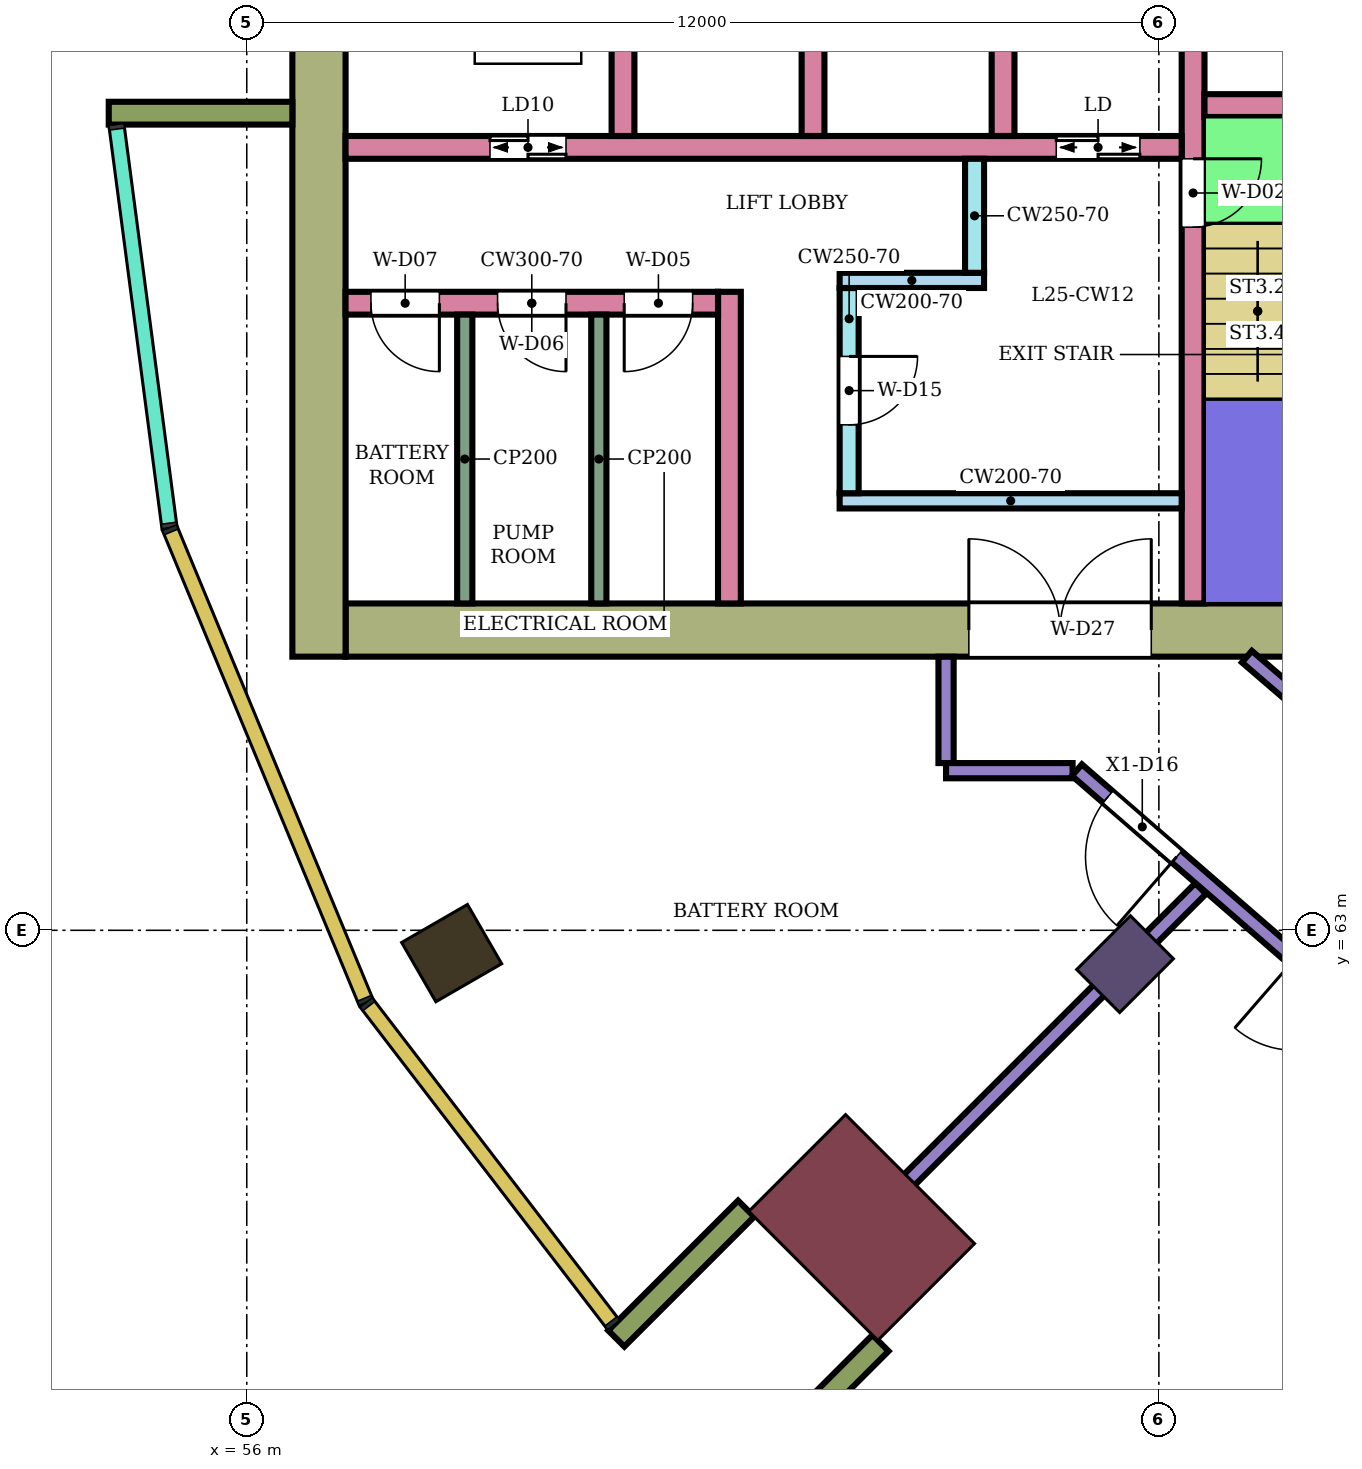
"""IFC4 building model, lengths in metres.
Left out: names, types, materials, properties, quantities, classifications, styles, units other than length and angle.
Written with IfcOpenShell. Run it as: python <this file> out.ifc"""

import sys

from ifc_helpers import new_model, si_unit, direction, frame, frame_2d, origin, origin_2d, place, context, subcontext, project, spatial, rectangle, extrude, element, fill, save


model = new_model("IFC4")
c1 = context("Model", 3, precision=1e-05, world=origin(), true_north=direction((0.0, 1.0)))
c2 = subcontext(c1, "Body", "Model", "MODEL_VIEW")
j1 = project(units=[si_unit("LENGTHUNIT", "METRE"), si_unit("PLANEANGLEUNIT", "RADIAN")], contexts=[c1])
p1 = place(None, origin())
s1 = spatial("IfcSite", under=j1, at=p1, CompositionType="ELEMENT")
p2 = place(p1, origin())
s2 = spatial("IfcBuilding", under=s1, at=p2, CompositionType="ELEMENT")
p3 = place(p2, frame((0.0, 0.0, 109.0)))
s3 = spatial("IfcBuildingStorey", under=s2, at=p3, CompositionType="ELEMENT", Elevation=109.0)
p4 = place(p3, frame((58.696, 62.7, 0.0), z_axis=(0.0, 0.0, 1.0), x_axis=(-0.866025403784, -0.5, 0.0)))
e1 = element("IfcColumn", 1, at=p4, inside=s3, PredefinedType="COLUMN", context=c2, shape_type="SweptSolid", body=[
    extrude(rectangle(XDim=1.0, YDim=0.9, at=origin_2d()), origin(), (0.0, 0.0, 1.0), 5.6),
])
p5 = place(p3, frame((67.555, 62.555, 0.0), z_axis=(0.0, 0.0, 1.0), x_axis=(-0.707106781187, -0.707106781187, 0.0)))
e2 = element("IfcColumn", 2, at=p5, inside=s3, PredefinedType="COLUMN", context=c2, shape_type="SweptSolid", body=[
    extrude(rectangle(XDim=1.0, YDim=0.8, at=origin_2d()), origin(), (0.0, 0.0, 1.0), 5.6),
])
p6 = place(p3, frame((64.09, 59.09, 0.0), z_axis=(0.0, 0.0, 1.0), x_axis=(-0.707106781187, -0.707106781187, 0.0)))
e3 = element("IfcColumn", 3, at=p6, inside=s3, PredefinedType="COLUMN", context=c2, shape_type="SweptSolid", body=[
    extrude(rectangle(XDim=1.8, YDim=2.4, at=origin_2d()), origin(), (0.0, 0.0, 1.0), 5.6),
])
p7 = place(p3, frame((72.1, 66.95, 0.0), z_axis=(0.0, 0.0, 1.0), x_axis=(-1.0, 0.0, 0.0)))
e4 = element("IfcWall", 4, at=p7, inside=s3, PredefinedType="SHEAR", context=c2, shape_type="SweptSolid", body=[
    extrude(rectangle(XDim=14.8, YDim=0.7, at=frame_2d((7.4, 0.0))), origin(), (0.0, 0.0, 1.0), 5.28),
])
p8 = place(p7, frame((4.2, 0.0, 0.0)))
e5 = element("IfcOpeningElement", 5, at=p8, cuts=e4, PredefinedType="OPENING", context=c2, shape_type="SweptSolid", body=[
    extrude(rectangle(XDim=2.4, YDim=2.4, at=frame_2d((1.2, 1.2))), frame((0.0, 0.36, 0.0), z_axis=(0.0, -1.0, 0.0), x_axis=(1.0, 0.0, 0.0)), (0.0, 0.0, 1.0), 0.72),
])
p9 = place(p3, frame((56.95, 83.4, 0.0), z_axis=(0.0, 0.0, 1.0), x_axis=(0.0, -1.0, 0.0)))
e6 = element("IfcWall", 6, at=p9, inside=s3, PredefinedType="SHEAR", context=c2, shape_type="SweptSolid", body=[
    extrude(rectangle(XDim=16.8, YDim=0.7, at=frame_2d((8.4, 0.0))), origin(), (0.0, 0.0, 1.0), 5.28),
])
p10 = place(p3, frame((68.45, 75.0, 0.0), z_axis=(0.0, 0.0, 1.0), x_axis=(0.0, -1.0, 0.0)))
e7 = element("IfcWall", 7, at=p10, inside=s3, PredefinedType="SHEAR", context=c2, shape_type="SweptSolid", body=[
    extrude(rectangle(XDim=7.7, YDim=0.3, at=frame_2d((3.85, 0.0))), origin(), (0.0, 0.0, 1.0), 5.28),
])
p11 = place(p10, frame((1.85, 0.0, 0.0)))
e8 = element("IfcOpeningElement", 8, at=p11, cuts=e7, PredefinedType="OPENING", context=c2, shape_type="SweptSolid", body=[
    extrude(rectangle(XDim=0.9, YDim=2.1, at=frame_2d((0.45, 1.05))), frame((0.0, 0.16, 0.0), z_axis=(0.0, -1.0, 0.0), x_axis=(1.0, 0.0, 0.0)), (0.0, 0.0, 1.0), 0.32),
])
p12 = place(p3, frame((71.65, 73.85, 0.0), z_axis=(0.0, 0.0, 1.0), x_axis=(-1.0, 0.0, 0.0)))
e9 = element("IfcWall", 9, at=p12, inside=s3, PredefinedType="SHEAR", context=c2, shape_type="SweptSolid", body=[
    extrude(rectangle(XDim=3.05, YDim=0.3, at=frame_2d((1.525, 0.0))), origin(), (0.0, 0.0, 1.0), 5.28),
])
p13 = place(p12, frame((1.1, 0.0, 0.0)))
e10 = element("IfcOpeningElement", 10, at=p13, cuts=e9, PredefinedType="OPENING", context=c2, shape_type="SweptSolid", body=[
    extrude(rectangle(XDim=0.7, YDim=2.0, at=frame_2d((0.35, 1.0))), frame((0.0, 0.16, 0.0), z_axis=(0.0, -1.0, 0.0), x_axis=(1.0, 0.0, 0.0)), (0.0, 0.0, 1.0), 0.32),
])
p14 = place(p3, frame((68.3, 73.3, 0.0), z_axis=(0.0, 0.0, 1.0), x_axis=(-1.0, 0.0, 0.0)))
e11 = element("IfcWall", 11, at=p14, inside=s3, PredefinedType="SHEAR", context=c2, shape_type="SweptSolid", body=[
    extrude(rectangle(XDim=11.0, YDim=0.3, at=frame_2d((5.5, 0.0))), origin(), (0.0, 0.0, 1.0), 5.28),
])
p15 = place(p14, frame((0.55, 0.0, 0.0)))
e12 = element("IfcOpeningElement", 12, at=p15, cuts=e11, PredefinedType="OPENING", context=c2, shape_type="SweptSolid", body=[
    extrude(rectangle(XDim=1.1, YDim=2.1, at=frame_2d((0.55, 1.05))), frame((0.0, 0.16, 0.0), z_axis=(0.0, -1.0, 0.0), x_axis=(1.0, 0.0, 0.0)), (0.0, 0.0, 1.0), 0.32),
])
p16 = place(p14, frame((8.1, 0.0, 0.0)))
e13 = element("IfcOpeningElement", 13, at=p16, cuts=e11, PredefinedType="OPENING", context=c2, shape_type="SweptSolid", body=[
    extrude(rectangle(XDim=1.0, YDim=2.1, at=frame_2d((0.5, 1.05))), frame((0.0, 0.16, 0.0), z_axis=(0.0, -1.0, 0.0), x_axis=(1.0, 0.0, 0.0)), (0.0, 0.0, 1.0), 0.32),
])
for number, where, z_axis, x_axis in (
    (14, (65.95, 76.0, 0.0), (0.0, 0.0, 1.0), (0.0, -1.0, 0.0)),
    (15, (63.45, 76.0, 0.0), (0.0, 0.0, 1.0), (0.0, -1.0, 0.0)),
    (16, (60.95, 76.0, 0.0), (0.0, 0.0, 1.0), (0.0, -1.0, 0.0)),
):
    element("IfcWall", number, at=place(p3, frame(where, z_axis=z_axis, x_axis=x_axis)), inside=s3, PredefinedType="SHEAR", context=c2, shape_type="SweptSolid", body=[
        extrude(rectangle(XDim=2.55, YDim=0.3, at=frame_2d((1.275, 0.0))), origin(), (0.0, 0.0, 1.0), 5.28),
    ])
p17 = place(p3, frame((68.3, 68.65, 0.0), z_axis=(0.0, 0.0, 1.0), x_axis=(-1.0, 0.0, 0.0)))
e17 = element("IfcWall", 17, at=p17, inside=s3, PredefinedType="SHEAR", context=c2, shape_type="SweptSolid", body=[
    extrude(rectangle(XDim=4.5, YDim=0.2, at=frame_2d((2.25, 0.0))), origin(), (0.0, 0.0, 1.0), 5.28),
])
p18 = place(p3, frame((63.925, 71.45, 0.0), z_axis=(0.0, 0.0, 1.0), x_axis=(0.0, -1.0, 0.0)))
e18 = element("IfcWall", 18, at=p18, inside=s3, PredefinedType="SHEAR", context=c2, shape_type="SweptSolid", body=[
    extrude(rectangle(XDim=2.7, YDim=0.25, at=frame_2d((1.35, 0.0))), origin(), (0.0, 0.0, 1.0), 5.28),
])
p19 = place(p18, frame((0.9, 0.0, 0.0)))
e19 = element("IfcOpeningElement", 19, at=p19, cuts=e18, PredefinedType="OPENING", context=c2, shape_type="SweptSolid", body=[
    extrude(rectangle(XDim=0.9, YDim=2.1, at=frame_2d((0.45, 1.05))), frame((0.0, 0.135, 0.0), z_axis=(0.0, -1.0, 0.0), x_axis=(1.0, 0.0, 0.0)), (0.0, 0.0, 1.0), 0.27),
])
p20 = place(p3, frame((65.7, 71.55, 0.0), z_axis=(0.0, 0.0, 1.0), x_axis=(-1.0, 0.0, 0.0)))
e20 = element("IfcWall", 20, at=p20, inside=s3, PredefinedType="SHEAR", context=c2, shape_type="SweptSolid", body=[
    extrude(rectangle(XDim=1.9, YDim=0.2, at=frame_2d((0.95, 0.0))), origin(), (0.0, 0.0, 1.0), 5.28),
])
p21 = place(p3, frame((65.575, 73.15, 0.0), z_axis=(0.0, 0.0, 1.0), x_axis=(0.0, -1.0, 0.0)))
e21 = element("IfcWall", 21, at=p21, inside=s3, PredefinedType="SHEAR", context=c2, shape_type="SweptSolid", body=[
    extrude(rectangle(XDim=1.5, YDim=0.25, at=frame_2d((0.75, 0.0))), origin(), (0.0, 0.0, 1.0), 5.28),
])
p22 = place(p3, frame((62.35, 71.4, 0.0), z_axis=(0.0, 0.0, 1.0), x_axis=(0.0, -1.0, 0.0)))
e22 = element("IfcWall", 22, at=p22, inside=s3, PredefinedType="SHEAR", context=c2, shape_type="SweptSolid", body=[
    extrude(rectangle(XDim=4.1, YDim=0.3, at=frame_2d((2.05, 0.0))), origin(), (0.0, 0.0, 1.0), 5.28),
])
p23 = place(p3, frame((62.2, 71.25, 0.0), z_axis=(0.0, 0.0, 1.0), x_axis=(-1.0, 0.0, 0.0)))
e23 = element("IfcWall", 23, at=p23, inside=s3, PredefinedType="SHEAR", context=c2, shape_type="SweptSolid", body=[
    extrude(rectangle(XDim=4.9, YDim=0.3, at=frame_2d((2.45, 0.0))), origin(), (0.0, 0.0, 1.0), 5.28),
])
p24 = place(p23, frame((0.334, 0.0, 0.0)))
e24 = element("IfcOpeningElement", 24, at=p24, cuts=e23, PredefinedType="OPENING", context=c2, shape_type="SweptSolid", body=[
    extrude(rectangle(XDim=0.9, YDim=2.1, at=frame_2d((0.45, 1.05))), frame((0.0, 0.16, 0.0), z_axis=(0.0, -1.0, 0.0), x_axis=(1.0, 0.0, 0.0)), (0.0, 0.0, 1.0), 0.32),
])
p25 = place(p23, frame((2.0, 0.0, 0.0)))
e25 = element("IfcOpeningElement", 25, at=p25, cuts=e23, PredefinedType="OPENING", context=c2, shape_type="SweptSolid", body=[
    extrude(rectangle(XDim=0.9, YDim=2.1, at=frame_2d((0.45, 1.05))), frame((0.0, 0.16, 0.0), z_axis=(0.0, -1.0, 0.0), x_axis=(1.0, 0.0, 0.0)), (0.0, 0.0, 1.0), 0.32),
])
p26 = place(p23, frame((3.666, 0.0, 0.0)))
e26 = element("IfcOpeningElement", 26, at=p26, cuts=e23, PredefinedType="OPENING", context=c2, shape_type="SweptSolid", body=[
    extrude(rectangle(XDim=0.9, YDim=2.1, at=frame_2d((0.45, 1.05))), frame((0.0, 0.16, 0.0), z_axis=(0.0, -1.0, 0.0), x_axis=(1.0, 0.0, 0.0)), (0.0, 0.0, 1.0), 0.32),
])
for number, where, z_axis, x_axis in (
    (27, (56.6, 73.75, 0.0), (0.0, 0.0, 1.0), (-1.0, 0.0, 0.0)),
    (28, (62.57, 59.338, 0.0), (0.0, 0.0, 1.0), (-0.707, -0.707, 0.0)),
    (29, (64.338, 57.57, 0.0), (0.0, 0.0, 1.0), (-0.707, -0.707, 0.0)),
):
    element("IfcWall", number, at=place(p3, frame(where, z_axis=z_axis, x_axis=x_axis)), inside=s3, PredefinedType="NOTDEFINED", context=c2, shape_type="SweptSolid", body=[
        extrude(rectangle(XDim=2.416, YDim=0.3, at=frame_2d((1.208, 0.0))), origin(), (0.0, 0.0, 1.0), 5.6),
    ])
p27 = place(p3, frame((63.596, 58.596, 0.0), z_axis=(0.0, 0.0, 1.0), x_axis=(0.707106781187, 0.707106781187, 0.0)))
e30 = element("IfcWall", 30, at=p27, inside=s3, PredefinedType="PARTITIONING", context=c2, shape_type="SweptSolid", body=[
    extrude(rectangle(XDim=7.005, YDim=0.2, at=frame_2d((3.502, 0.0))), origin(), (0.0, 0.0, 1.0), 5.15),
])
p28 = place(p3, frame((65.2, 65.2, 0.0), z_axis=(0.0, 0.0, 1.0), x_axis=(0.0, 1.0, 0.0)))
e31 = element("IfcWall", 31, at=p28, inside=s3, PredefinedType="PARTITIONING", context=c2, shape_type="SweptSolid", body=[
    extrude(rectangle(XDim=1.399, YDim=0.2, at=frame_2d((0.7, 0.0))), origin(), (0.0, 0.0, 1.0), 5.15),
])
p29 = place(p3, frame((65.2, 65.1, 0.0), z_axis=(0.0, 0.0, 1.0), x_axis=(1.0, 0.0, 0.0)))
e32 = element("IfcWall", 32, at=p29, inside=s3, PredefinedType="PARTITIONING", context=c2, shape_type="SweptSolid", body=[
    extrude(rectangle(XDim=1.665, YDim=0.2, at=frame_2d((0.833, 0.0))), origin(), (0.0, 0.0, 1.0), 5.15),
])
p30 = place(p3, frame((66.922, 65.108, 0.0), z_axis=(0.0, 0.0, 1.0), x_axis=(0.755027260387, -0.655693400968, 0.0)))
e33 = element("IfcWall", 33, at=p30, inside=s3, PredefinedType="PARTITIONING", context=c2, shape_type="SweptSolid", body=[
    extrude(rectangle(XDim=6.516, YDim=0.2, at=frame_2d((3.258, 0.0))), origin(), (0.0, 0.0, 1.0), 5.15),
])
p31 = place(p30, frame((3.792, 0.0, 0.0)))
e34 = element("IfcOpeningElement", 34, at=p31, cuts=e33, PredefinedType="OPENING", context=c2, shape_type="SweptSolid", body=[
    extrude(rectangle(XDim=1.2, YDim=2.4, at=frame_2d((0.6, 1.2))), frame((0.0, 0.11, 0.0), z_axis=(0.0, -1.0, 0.0), x_axis=(1.0, 0.0, 0.0)), (0.0, 0.0, 1.0), 0.22),
])
p32 = place(p30, frame((0.539, 0.0, 0.0)))
e35 = element("IfcOpeningElement", 35, at=p32, cuts=e33, PredefinedType="OPENING", context=c2, shape_type="SweptSolid", body=[
    extrude(rectangle(XDim=1.2, YDim=2.4, at=frame_2d((0.6, 1.2))), frame((0.0, 0.11, 0.0), z_axis=(0.0, -1.0, 0.0), x_axis=(1.0, 0.0, 0.0)), (0.0, 0.0, 1.0), 0.22),
])
p33 = place(p3, frame((69.158, 66.6, 0.0), z_axis=(0.0, 0.0, 1.0), x_axis=(0.758063092745, -0.652181222835, 0.0)))
e36 = element("IfcWall", 36, at=p33, inside=s3, PredefinedType="PARTITIONING", context=c2, shape_type="SweptSolid", body=[
    extrude(rectangle(XDim=5.16, YDim=0.2, at=frame_2d((2.58, 0.0))), origin(), (0.0, 0.0, 1.0), 5.15),
])
p34 = place(p33, frame((2.015, 0.0, 0.0)))
e37 = element("IfcOpeningElement", 37, at=p34, cuts=e36, PredefinedType="OPENING", context=c2, shape_type="SweptSolid", body=[
    extrude(rectangle(XDim=1.2, YDim=2.4, at=frame_2d((0.6, 1.2))), frame((0.0, 0.11, 0.0), z_axis=(0.0, -1.0, 0.0), x_axis=(1.0, 0.0, 0.0)), (0.0, 0.0, 1.0), 0.22),
])
for number, where, z_axis, x_axis in (
    (38, (60.632, 71.1, 0.0), (0.0, 0.0, 1.0), (0.0, -1.0, 0.0)),
    (39, (58.868, 71.1, 0.0), (0.0, 0.0, 1.0), (0.0, -1.0, 0.0)),
):
    element("IfcWall", number, at=place(p3, frame(where, z_axis=z_axis, x_axis=x_axis)), inside=s3, PredefinedType="PARTITIONING", context=c2, shape_type="SweptSolid", body=[
        extrude(rectangle(XDim=3.8, YDim=0.2, at=frame_2d((1.9, 0.0))), origin(), (0.0, 0.0, 1.0), 5.28),
    ])
p35 = place(p32, frame((1.2, 0.0, 0.0), z_axis=(0.0, 0.0, 1.0), x_axis=(-1.0, 0.0, 0.0)))
e40 = element("IfcDoor", 40, at=p35, inside=s3, OperationType="SINGLE_SWING_LEFT", PredefinedType="DOOR", context=c2, shape_type="SweptSolid", body=[
    extrude(rectangle(XDim=1.2, YDim=2.4, at=frame_2d((0.6, 1.2))), frame((0.0, 0.025, 0.0), z_axis=(0.0, -1.0, 0.0), x_axis=(1.0, 0.0, 0.0)), (0.0, 0.0, 1.0), 0.05),
])
fill(e35, e40)
p36 = place(p11, origin())
e41 = element("IfcDoor", 41, at=p36, inside=s3, OperationType="SINGLE_SWING_LEFT", PredefinedType="DOOR", context=c2, shape_type="SweptSolid", body=[
    extrude(rectangle(XDim=0.9, YDim=2.1, at=frame_2d((0.45, 1.05))), frame((0.0, 0.025, 0.0), z_axis=(0.0, -1.0, 0.0), x_axis=(1.0, 0.0, 0.0)), (0.0, 0.0, 1.0), 0.05),
])
fill(e8, e41)
p37 = place(p15, origin())
e42 = element("IfcDoor", 42, at=p37, inside=s3, OperationType="DOUBLE_DOOR_SLIDING", PredefinedType="DOOR", context=c2, shape_type="SweptSolid", body=[
    extrude(rectangle(XDim=1.1, YDim=2.1, at=frame_2d((0.55, 1.05))), frame((0.0, 0.025, 0.0), z_axis=(0.0, -1.0, 0.0), x_axis=(1.0, 0.0, 0.0)), (0.0, 0.0, 1.0), 0.05),
])
fill(e12, e42)
p38 = place(p16, origin())
e43 = element("IfcDoor", 43, at=p38, inside=s3, OperationType="DOUBLE_DOOR_SLIDING", PredefinedType="DOOR", context=c2, shape_type="SweptSolid", body=[
    extrude(rectangle(XDim=1.0, YDim=2.1, at=frame_2d((0.5, 1.05))), frame((0.0, 0.025, 0.0), z_axis=(0.0, -1.0, 0.0), x_axis=(1.0, 0.0, 0.0)), (0.0, 0.0, 1.0), 0.05),
])
fill(e13, e43)
p39 = place(p19, origin())
e44 = element("IfcDoor", 44, at=p39, inside=s3, OperationType="SINGLE_SWING_LEFT", PredefinedType="DOOR", context=c2, shape_type="SweptSolid", body=[
    extrude(rectangle(XDim=0.9, YDim=2.1, at=frame_2d((0.45, 1.05))), frame((0.0, 0.025, 0.0), z_axis=(0.0, -1.0, 0.0), x_axis=(1.0, 0.0, 0.0)), (0.0, 0.0, 1.0), 0.05),
])
fill(e19, e44)
p40 = place(p24, origin())
e45 = element("IfcDoor", 45, at=p40, inside=s3, OperationType="SINGLE_SWING_RIGHT", PredefinedType="DOOR", context=c2, shape_type="SweptSolid", body=[
    extrude(rectangle(XDim=0.9, YDim=2.1, at=frame_2d((0.45, 1.05))), frame((0.0, 0.025, 0.0), z_axis=(0.0, -1.0, 0.0), x_axis=(1.0, 0.0, 0.0)), (0.0, 0.0, 1.0), 0.05),
])
fill(e24, e45)
p41 = place(p25, origin())
e46 = element("IfcDoor", 46, at=p41, inside=s3, OperationType="SINGLE_SWING_LEFT", PredefinedType="DOOR", context=c2, shape_type="SweptSolid", body=[
    extrude(rectangle(XDim=0.9, YDim=2.1, at=frame_2d((0.45, 1.05))), frame((0.0, 0.025, 0.0), z_axis=(0.0, -1.0, 0.0), x_axis=(1.0, 0.0, 0.0)), (0.0, 0.0, 1.0), 0.05),
])
fill(e25, e46)
p42 = place(p26, origin())
e47 = element("IfcDoor", 47, at=p42, inside=s3, OperationType="SINGLE_SWING_LEFT", PredefinedType="DOOR", context=c2, shape_type="SweptSolid", body=[
    extrude(rectangle(XDim=0.9, YDim=2.1, at=frame_2d((0.45, 1.05))), frame((0.0, 0.025, 0.0), z_axis=(0.0, -1.0, 0.0), x_axis=(1.0, 0.0, 0.0)), (0.0, 0.0, 1.0), 0.05),
])
fill(e26, e47)
p43 = place(p8, frame((2.4, 0.0, 0.0), z_axis=(0.0, 0.0, 1.0), x_axis=(-1.0, 0.0, 0.0)))
e48 = element("IfcDoor", 48, at=p43, inside=s3, OperationType="DOUBLE_DOOR_SINGLE_SWING", PredefinedType="DOOR", context=c2, shape_type="SweptSolid", body=[
    extrude(rectangle(XDim=2.4, YDim=2.4, at=frame_2d((1.2, 1.2))), frame((0.0, 0.025, 0.0), z_axis=(0.0, -1.0, 0.0), x_axis=(1.0, 0.0, 0.0)), (0.0, 0.0, 1.0), 0.05),
])
fill(e5, e48)
save(model, sys.argv[1])
